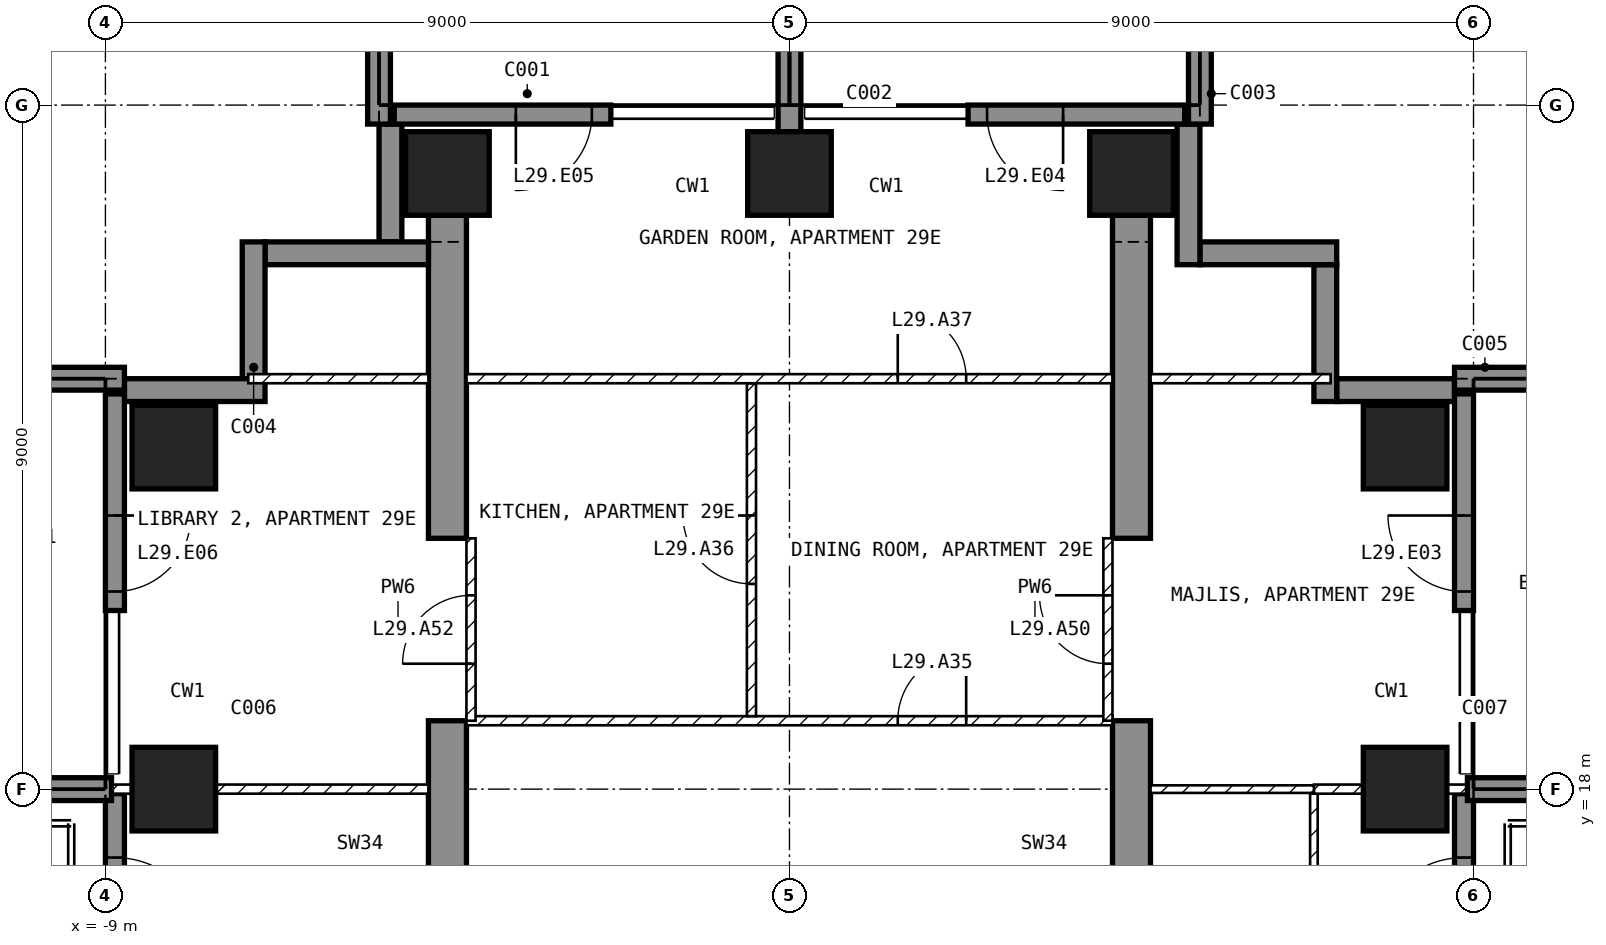
"""IFC4 building model, lengths in metres.
Left out: names, types, materials, properties, quantities, classifications, styles, units other than length and angle.
Written with IfcOpenShell. Run it as: python <this file> out.ifc"""

import sys

from ifc_helpers import new_model, si_unit, direction, frame, frame_2d, origin, origin_2d, place, context, subcontext, project, spatial, polyline, rectangle, outline, extrude, element, fill, save


model = new_model("IFC4")
c1 = context("Model", 3, precision=1e-05, world=origin(), true_north=direction((0.0, 1.0)))
c2 = subcontext(c1, "Body", "Model", "MODEL_VIEW")
j1 = project(units=[si_unit("LENGTHUNIT", "METRE"), si_unit("PLANEANGLEUNIT", "RADIAN")], contexts=[c1])
p1 = place(None, origin())
s1 = spatial("IfcSite", under=j1, at=p1, CompositionType="ELEMENT")
p2 = place(p1, origin())
s2 = spatial("IfcBuilding", under=s1, at=p2, CompositionType="ELEMENT")
p3 = place(p2, frame((0.0, 0.0, 123.4)))
s3 = spatial("IfcBuildingStorey", under=s2, at=p3, CompositionType="ELEMENT", Elevation=123.4)
for number, where, z_axis, x_axis in (
    (1, (-8.1, 18.0, -0.25), (0.0, 0.0, 1.0), (1.0, 0.0, 0.0)),
    (2, (-8.1, 22.5, -0.25), (0.0, 0.0, 1.0), (1.0, 0.0, 0.0)),
    (3, (-4.5, 26.1, -0.25), (0.0, 0.0, 1.0), (1.0, 0.0, 0.0)),
    (4, (0.0, 26.1, -0.25), (0.0, 0.0, 1.0), (1.0, 0.0, 0.0)),
    (5, (4.5, 26.1, -0.25), (0.0, 0.0, 1.0), (1.0, 0.0, 0.0)),
    (6, (8.1, 18.0, -0.25), (0.0, 0.0, 1.0), (1.0, 0.0, 0.0)),
    (7, (8.1, 22.5, -0.25), (0.0, 0.0, 1.0), (1.0, 0.0, 0.0)),
):
    element("IfcColumn", number, at=place(p3, frame(where, z_axis=z_axis, x_axis=x_axis)), inside=s3, PredefinedType="COLUMN", context=c2, shape_type="SweptSolid", body=[
        extrude(rectangle(XDim=1.1, YDim=1.1, at=origin_2d()), origin(), (0.0, 0.0, 1.0), 3.5),
    ])
for number, where, z_axis, x_axis in (
    (8, (-4.75, 9.0, -0.25), (1.0, 0.0, 0.0), (0.0, 1.0, 0.0)),
    (9, (4.25, 9.0, -0.25), (1.0, 0.0, 0.0), (0.0, 1.0, 0.0)),
):
    element("IfcWall", number, at=place(p3, frame(where, z_axis=z_axis, x_axis=x_axis)), inside=s3, PredefinedType="SHEAR", context=c2, shape_type="SweptSolid", body=[
        extrude(outline(polyline([(0.0, 0.0), (2.1, 0.0), (2.1, 2.65), (4.5, 2.65), (4.5, 0.0), (9.9, 0.0), (9.9, 2.65), (12.3, 2.65), (12.3, 0.0), (16.55, 0.0), (16.55, 3.5), (0.0, 3.5), (0.0, 0.0)])), origin(), (0.0, 0.0, 1.0), 0.5),
    ])
p4 = place(p3, frame((8.875, 15.65, 0.0), z_axis=(0.0, 0.0, 1.0), x_axis=(0.0, 1.0, 0.0)))
e10 = element("IfcWall", 10, at=p4, inside=s3, PredefinedType="SOLIDWALL", context=c2, shape_type="SweptSolid", body=[
    extrude(rectangle(XDim=2.29, YDim=0.25, at=frame_2d((1.145, 0.0))), origin(), (0.0, 0.0, 1.0), 3.25),
])
p5 = place(p4, frame((0.25, 0.0, 0.0)))
e11 = element("IfcOpeningElement", 11, at=p5, cuts=e10, PredefinedType="OPENING", context=c2, shape_type="SweptSolid", body=[
    extrude(rectangle(XDim=1.2, YDim=2.4, at=frame_2d((0.6, 1.2))), frame((0.0, 0.135, 0.0), z_axis=(0.0, -1.0, 0.0), x_axis=(1.0, 0.0, 0.0)), (0.0, 0.0, 1.0), 0.27),
])
p6 = place(p3, frame((8.875, 20.35, 0.0), z_axis=(0.0, 0.0, 1.0), x_axis=(0.0, 1.0, 0.0)))
e12 = element("IfcWall", 12, at=p6, inside=s3, PredefinedType="SOLIDWALL", context=c2, shape_type="SweptSolid", body=[
    extrude(rectangle(XDim=2.85, YDim=0.25, at=frame_2d((1.425, 0.0))), origin(), (0.0, 0.0, 1.0), 3.25),
])
p7 = place(p6, frame((0.25, 0.0, 0.0)))
e13 = element("IfcOpeningElement", 13, at=p7, cuts=e12, PredefinedType="OPENING", context=c2, shape_type="SweptSolid", body=[
    extrude(rectangle(XDim=1.0, YDim=2.4, at=frame_2d((0.5, 1.2))), frame((0.0, 0.135, 0.0), z_axis=(0.0, -1.0, 0.0), x_axis=(1.0, 0.0, 0.0)), (0.0, 0.0, 1.0), 0.27),
])
p8 = place(p3, frame((5.2, 26.875, 0.0), z_axis=(0.0, 0.0, 1.0), x_axis=(-1.0, 0.0, 0.0)))
e14 = element("IfcWall", 14, at=p8, inside=s3, PredefinedType="SOLIDWALL", context=c2, shape_type="SweptSolid", body=[
    extrude(rectangle(XDim=2.85, YDim=0.25, at=frame_2d((1.425, 0.0))), origin(), (0.0, 0.0, 1.0), 3.25),
])
p9 = place(p8, frame((1.6, 0.0, 0.0)))
e15 = element("IfcOpeningElement", 15, at=p9, cuts=e14, PredefinedType="OPENING", context=c2, shape_type="SweptSolid", body=[
    extrude(rectangle(XDim=1.0, YDim=2.4, at=frame_2d((0.5, 1.2))), frame((0.0, 0.135, 0.0), z_axis=(0.0, -1.0, 0.0), x_axis=(1.0, 0.0, 0.0)), (0.0, 0.0, 1.0), 0.27),
])
p10 = place(p3, frame((-2.35, 26.875, 0.0), z_axis=(0.0, 0.0, 1.0), x_axis=(-1.0, 0.0, 0.0)))
e16 = element("IfcWall", 16, at=p10, inside=s3, PredefinedType="SOLIDWALL", context=c2, shape_type="SweptSolid", body=[
    extrude(rectangle(XDim=2.85, YDim=0.25, at=frame_2d((1.425, 0.0))), origin(), (0.0, 0.0, 1.0), 3.25),
])
p11 = place(p10, frame((0.25, 0.0, 0.0)))
e17 = element("IfcOpeningElement", 17, at=p11, cuts=e16, PredefinedType="OPENING", context=c2, shape_type="SweptSolid", body=[
    extrude(rectangle(XDim=1.0, YDim=2.4, at=frame_2d((0.5, 1.2))), frame((0.0, 0.135, 0.0), z_axis=(0.0, -1.0, 0.0), x_axis=(1.0, 0.0, 0.0)), (0.0, 0.0, 1.0), 0.27),
])
p12 = place(p3, frame((-8.875, 23.2, 0.0), z_axis=(0.0, 0.0, 1.0), x_axis=(0.0, -1.0, 0.0)))
e18 = element("IfcWall", 18, at=p12, inside=s3, PredefinedType="SOLIDWALL", context=c2, shape_type="SweptSolid", body=[
    extrude(rectangle(XDim=2.85, YDim=0.25, at=frame_2d((1.425, 0.0))), origin(), (0.0, 0.0, 1.0), 3.25),
])
p13 = place(p12, frame((1.6, 0.0, 0.0)))
e19 = element("IfcOpeningElement", 19, at=p13, cuts=e18, PredefinedType="OPENING", context=c2, shape_type="SweptSolid", body=[
    extrude(rectangle(XDim=1.0, YDim=2.4, at=frame_2d((0.5, 1.2))), frame((0.0, 0.135, 0.0), z_axis=(0.0, -1.0, 0.0), x_axis=(1.0, 0.0, 0.0)), (0.0, 0.0, 1.0), 0.27),
])
p14 = place(p3, frame((-8.875, 17.94, 0.0), z_axis=(0.0, 0.0, 1.0), x_axis=(0.0, -1.0, 0.0)))
e20 = element("IfcWall", 20, at=p14, inside=s3, PredefinedType="SOLIDWALL", context=c2, shape_type="SweptSolid", body=[
    extrude(rectangle(XDim=2.29, YDim=0.25, at=frame_2d((1.145, 0.0))), origin(), (0.0, 0.0, 1.0), 3.25),
])
p15 = place(p14, frame((0.84, 0.0, 0.0)))
e21 = element("IfcOpeningElement", 21, at=p15, cuts=e20, PredefinedType="OPENING", context=c2, shape_type="SweptSolid", body=[
    extrude(rectangle(XDim=1.2, YDim=2.4, at=frame_2d((0.6, 1.2))), frame((0.0, 0.135, 0.0), z_axis=(0.0, -1.0, 0.0), x_axis=(1.0, 0.0, 0.0)), (0.0, 0.0, 1.0), 0.27),
])
p16 = place(p3, frame((8.75, 23.25, 0.0), z_axis=(0.0, 0.0, 1.0), x_axis=(-1.0, 0.0, 0.0)))
e22 = element("IfcWall", 22, at=p16, inside=s3, PredefinedType="SOLIDWALL", context=c2, shape_type="SweptSolid", body=[
    extrude(rectangle(XDim=1.55, YDim=0.3, at=frame_2d((0.775, 0.0))), origin(), (0.0, 0.0, 1.0), 3.25),
])
p17 = place(p3, frame((7.05, 23.1, 0.0), z_axis=(0.0, 0.0, 1.0), x_axis=(0.0, 1.0, 0.0)))
e23 = element("IfcWall", 23, at=p17, inside=s3, PredefinedType="SOLIDWALL", context=c2, shape_type="SweptSolid", body=[
    extrude(rectangle(XDim=1.8, YDim=0.3, at=frame_2d((0.9, 0.0))), origin(), (0.0, 0.0, 1.0), 3.25),
])
p18 = place(p3, frame((7.2, 25.05, 0.0), z_axis=(0.0, 0.0, 1.0), x_axis=(-1.0, 0.0, 0.0)))
e24 = element("IfcWall", 24, at=p18, inside=s3, PredefinedType="SOLIDWALL", context=c2, shape_type="SweptSolid", body=[
    extrude(rectangle(XDim=1.8, YDim=0.3, at=frame_2d((0.9, 0.0))), origin(), (0.0, 0.0, 1.0), 3.25),
])
p19 = place(p3, frame((5.25, 24.9, 0.0), z_axis=(0.0, 0.0, 1.0), x_axis=(0.0, 1.0, 0.0)))
e25 = element("IfcWall", 25, at=p19, inside=s3, PredefinedType="SOLIDWALL", context=c2, shape_type="SweptSolid", body=[
    extrude(rectangle(XDim=1.85, YDim=0.3, at=frame_2d((0.925, 0.0))), origin(), (0.0, 0.0, 1.0), 3.25),
])
p20 = place(p3, frame((-5.25, 26.75, 0.0), z_axis=(0.0, 0.0, 1.0), x_axis=(0.0, -1.0, 0.0)))
e26 = element("IfcWall", 26, at=p20, inside=s3, PredefinedType="SOLIDWALL", context=c2, shape_type="SweptSolid", body=[
    extrude(rectangle(XDim=1.55, YDim=0.3, at=frame_2d((0.775, 0.0))), origin(), (0.0, 0.0, 1.0), 3.25),
])
p21 = place(p3, frame((-4.75, 25.05, 0.0), z_axis=(0.0, 0.0, 1.0), x_axis=(-1.0, 0.0, 0.0)))
e27 = element("IfcWall", 27, at=p21, inside=s3, PredefinedType="SOLIDWALL", context=c2, shape_type="SweptSolid", body=[
    extrude(rectangle(XDim=2.15, YDim=0.3, at=frame_2d((1.075, 0.0))), origin(), (0.0, 0.0, 1.0), 3.25),
])
p22 = place(p3, frame((-7.05, 25.2, 0.0), z_axis=(0.0, 0.0, 1.0), x_axis=(0.0, -1.0, 0.0)))
e28 = element("IfcWall", 28, at=p22, inside=s3, PredefinedType="SOLIDWALL", context=c2, shape_type="SweptSolid", body=[
    extrude(rectangle(XDim=1.8, YDim=0.3, at=frame_2d((0.9, 0.0))), origin(), (0.0, 0.0, 1.0), 3.25),
])
p23 = place(p3, frame((-6.9, 23.25, 0.0), z_axis=(0.0, 0.0, 1.0), x_axis=(-1.0, 0.0, 0.0)))
e29 = element("IfcWall", 29, at=p23, inside=s3, PredefinedType="SOLIDWALL", context=c2, shape_type="SweptSolid", body=[
    extrude(rectangle(XDim=1.85, YDim=0.3, at=frame_2d((0.925, 0.0))), origin(), (0.0, 0.0, 1.0), 3.25),
])
p24 = place(p3, frame((-8.92, 18.0, 0.0), z_axis=(0.0, 0.0, 1.0), x_axis=(-1.0, 0.0, 0.0)))
e30 = element("IfcWall", 30, at=p24, inside=s3, PredefinedType="SOLIDWALL", context=c2, shape_type="SweptSolid", body=[
    extrude(rectangle(XDim=2.82, YDim=0.3, at=frame_2d((1.41, 0.0))), origin(), (0.0, 0.0, 1.0), 3.25),
])
for number, where, z_axis, x_axis in (
    (31, (-8.75, 23.4, 0.0), (0.0, 0.0, 1.0), (-1.0, 0.0, 0.0)),
    (32, (-5.4, 26.75, 0.0), (0.0, 0.0, 1.0), (0.0, 1.0, 0.0)),
):
    element("IfcWall", number, at=place(p3, frame(where, z_axis=z_axis, x_axis=x_axis)), inside=s3, PredefinedType="SOLIDWALL", context=c2, shape_type="SweptSolid", body=[
        extrude(rectangle(XDim=2.95, YDim=0.3, at=frame_2d((1.475, 0.0))), origin(), (0.0, 0.0, 1.0), 3.25),
    ])
p25 = place(p3, frame((0.0, 26.65, 0.0), z_axis=(0.0, 0.0, 1.0), x_axis=(0.0, 1.0, 0.0)))
e33 = element("IfcWall", 33, at=p25, inside=s3, PredefinedType="SOLIDWALL", context=c2, shape_type="SweptSolid", body=[
    extrude(rectangle(XDim=3.05, YDim=0.3, at=frame_2d((1.525, 0.0))), origin(), (0.0, 0.0, 1.0), 3.25),
])
p26 = place(p3, frame((5.4, 26.75, 0.0), z_axis=(0.0, 0.0, 1.0), x_axis=(0.0, 1.0, 0.0)))
e34 = element("IfcWall", 34, at=p26, inside=s3, PredefinedType="SOLIDWALL", context=c2, shape_type="SweptSolid", body=[
    extrude(rectangle(XDim=2.95, YDim=0.3, at=frame_2d((1.475, 0.0))), origin(), (0.0, 0.0, 1.0), 3.25),
])
p27 = place(p3, frame((8.92, 18.0, 0.0), z_axis=(0.0, 0.0, 1.0), x_axis=(1.0, 0.0, 0.0)))
e35 = element("IfcWall", 35, at=p27, inside=s3, PredefinedType="SOLIDWALL", context=c2, shape_type="SweptSolid", body=[
    extrude(rectangle(XDim=2.82, YDim=0.3, at=frame_2d((1.41, 0.0))), origin(), (0.0, 0.0, 1.0), 3.25),
])
p28 = place(p3, frame((8.75, 23.4, 0.0), z_axis=(0.0, 0.0, 1.0), x_axis=(1.0, 0.0, 0.0)))
e36 = element("IfcWall", 36, at=p28, inside=s3, PredefinedType="SOLIDWALL", context=c2, shape_type="SweptSolid", body=[
    extrude(rectangle(XDim=2.95, YDim=0.3, at=frame_2d((1.475, 0.0))), origin(), (0.0, 0.0, 1.0), 3.25),
])
p29 = place(p3, frame((-4.25, 18.9, 0.0), z_axis=(0.0, 0.0, 1.0), x_axis=(1.0, 0.0, 0.0)))
e37 = element("IfcWall", 37, at=p29, inside=s3, PredefinedType="PARTITIONING", context=c2, shape_type="SweptSolid", body=[
    extrude(rectangle(XDim=8.5, YDim=0.12, at=frame_2d((4.25, 0.0))), origin(), (0.0, 0.0, 1.0), 3.25),
])
p30 = place(p29, frame((5.675, 0.0, 0.0)))
e38 = element("IfcOpeningElement", 38, at=p30, cuts=e37, PredefinedType="OPENING", context=c2, shape_type="SweptSolid", body=[
    extrude(rectangle(XDim=0.9, YDim=2.1, at=frame_2d((0.45, 1.05))), frame((0.0, 0.07, 0.0), z_axis=(0.0, -1.0, 0.0), x_axis=(1.0, 0.0, 0.0)), (0.0, 0.0, 1.0), 0.14),
])
p31 = place(p3, frame((-0.5, 18.96, 0.0), z_axis=(0.0, 0.0, 1.0), x_axis=(0.0, 1.0, 0.0)))
e39 = element("IfcWall", 39, at=p31, inside=s3, PredefinedType="PARTITIONING", context=c2, shape_type="SweptSolid", body=[
    extrude(rectangle(XDim=4.38, YDim=0.12, at=frame_2d((2.19, 0.0))), origin(), (0.0, 0.0, 1.0), 3.25),
])
p32 = place(p31, frame((1.74, 0.0, 0.0)))
e40 = element("IfcOpeningElement", 40, at=p32, cuts=e39, PredefinedType="OPENING", context=c2, shape_type="SweptSolid", body=[
    extrude(rectangle(XDim=0.9, YDim=2.1, at=frame_2d((0.45, 1.05))), frame((0.0, 0.07, 0.0), z_axis=(0.0, -1.0, 0.0), x_axis=(1.0, 0.0, 0.0)), (0.0, 0.0, 1.0), 0.14),
])
p33 = place(p3, frame((-4.25, 23.4, 0.0), z_axis=(0.0, 0.0, 1.0), x_axis=(1.0, 0.0, 0.0)))
e41 = element("IfcWall", 41, at=p33, inside=s3, PredefinedType="PARTITIONING", context=c2, shape_type="SweptSolid", body=[
    extrude(rectangle(XDim=8.5, YDim=0.12, at=frame_2d((4.25, 0.0))), origin(), (0.0, 0.0, 1.0), 3.25),
])
p34 = place(p33, frame((5.675, 0.0, 0.0)))
e42 = element("IfcOpeningElement", 42, at=p34, cuts=e41, PredefinedType="OPENING", context=c2, shape_type="SweptSolid", body=[
    extrude(rectangle(XDim=0.9, YDim=2.1, at=frame_2d((0.45, 1.05))), frame((0.0, 0.07, 0.0), z_axis=(0.0, -1.0, 0.0), x_axis=(1.0, 0.0, 0.0)), (0.0, 0.0, 1.0), 0.14),
])
p35 = place(p3, frame((6.9, 14.45, 0.0), z_axis=(0.0, 0.0, 1.0), x_axis=(0.0, 1.0, 0.0)))
e43 = element("IfcWall", 43, at=p35, inside=s3, PredefinedType="PARTITIONING", context=c2, shape_type="SweptSolid", body=[
    extrude(rectangle(XDim=3.49, YDim=0.1, at=frame_2d((1.745, 0.0))), origin(), (0.0, 0.0, 1.0), 3.25),
])
p36 = place(p3, frame((6.9, 18.0, 0.0), z_axis=(0.0, 0.0, 1.0), x_axis=(1.0, 0.0, 0.0)))
e44 = element("IfcWall", 44, at=p36, inside=s3, PredefinedType="PARTITIONING", context=c2, shape_type="SweptSolid", body=[
    extrude(rectangle(XDim=2.02, YDim=0.12, at=frame_2d((1.01, 0.0))), origin(), (0.0, 0.0, 1.0), 2.414),
])
p37 = place(p3, frame((4.75, 18.0, 0.0), z_axis=(0.0, 0.0, 1.0), x_axis=(1.0, 0.0, 0.0)))
e45 = element("IfcWall", 45, at=p37, inside=s3, PredefinedType="PARTITIONING", context=c2, shape_type="SweptSolid", body=[
    extrude(rectangle(XDim=2.15, YDim=0.1, at=frame_2d((1.075, 0.0))), origin(), (0.0, 0.0, 1.0), 2.414),
])
p38 = place(p3, frame((4.75, 23.4, 0.0), z_axis=(0.0, 0.0, 1.0), x_axis=(1.0, 0.0, 0.0)))
e46 = element("IfcWall", 46, at=p38, inside=s3, PredefinedType="PARTITIONING", context=c2, shape_type="SweptSolid", body=[
    extrude(rectangle(XDim=2.37, YDim=0.12, at=frame_2d((1.185, 0.0))), origin(), (0.0, 0.0, 1.0), 3.25),
])
p39 = place(p3, frame((-8.92, 18.0, 0.0), z_axis=(0.0, 0.0, 1.0), x_axis=(1.0, 0.0, 0.0)))
e47 = element("IfcWall", 47, at=p39, inside=s3, PredefinedType="PARTITIONING", context=c2, shape_type="SweptSolid", body=[
    extrude(rectangle(XDim=4.17, YDim=0.12, at=frame_2d((2.085, 0.0))), origin(), (0.0, 0.0, 1.0), 2.414),
])
p40 = place(p3, frame((-7.12, 23.4, 0.0), z_axis=(0.0, 0.0, 1.0), x_axis=(1.0, 0.0, 0.0)))
e48 = element("IfcWall", 48, at=p40, inside=s3, PredefinedType="PARTITIONING", context=c2, shape_type="SweptSolid", body=[
    extrude(rectangle(XDim=2.37, YDim=0.12, at=frame_2d((1.185, 0.0))), origin(), (0.0, 0.0, 1.0), 3.25),
])
p41 = place(p3, frame((4.19, 18.9, 0.0), z_axis=(0.0, 0.0, 1.0), x_axis=(0.0, 1.0, 0.0)))
e49 = element("IfcWall", 49, at=p41, inside=s3, PredefinedType="PARTITIONING", context=c2, shape_type="SweptSolid", body=[
    extrude(rectangle(XDim=2.4, YDim=0.12, at=frame_2d((1.2, 0.0))), origin(), (0.0, 0.0, 1.0), 2.4),
])
p42 = place(p41, frame((0.75, 0.0, 0.0)))
e50 = element("IfcOpeningElement", 50, at=p42, cuts=e49, PredefinedType="OPENING", context=c2, shape_type="SweptSolid", body=[
    extrude(rectangle(XDim=0.9, YDim=2.1, at=frame_2d((0.45, 1.05))), frame((0.0, 0.07, 0.0), z_axis=(0.0, -1.0, 0.0), x_axis=(1.0, 0.0, 0.0)), (0.0, 0.0, 1.0), 0.14),
])
p43 = place(p3, frame((-4.19, 18.9, 0.0), z_axis=(0.0, 0.0, 1.0), x_axis=(0.0, 1.0, 0.0)))
e51 = element("IfcWall", 51, at=p43, inside=s3, PredefinedType="PARTITIONING", context=c2, shape_type="SweptSolid", body=[
    extrude(rectangle(XDim=2.4, YDim=0.12, at=frame_2d((1.2, 0.0))), origin(), (0.0, 0.0, 1.0), 2.4),
])
p44 = place(p43, frame((0.75, 0.0, 0.0)))
e52 = element("IfcOpeningElement", 52, at=p44, cuts=e51, PredefinedType="OPENING", context=c2, shape_type="SweptSolid", body=[
    extrude(rectangle(XDim=0.9, YDim=2.1, at=frame_2d((0.45, 1.05))), frame((0.0, 0.07, 0.0), z_axis=(0.0, -1.0, 0.0), x_axis=(1.0, 0.0, 0.0)), (0.0, 0.0, 1.0), 0.14),
])
p45 = place(p5, origin())
e53 = element("IfcDoor", 53, at=p45, inside=s3, OperationType="SINGLE_SWING_LEFT", PredefinedType="DOOR", context=c2, shape_type="SweptSolid", body=[
    extrude(rectangle(XDim=1.2, YDim=2.4, at=frame_2d((0.6, 1.2))), frame((0.0, 0.025, 0.0), z_axis=(0.0, -1.0, 0.0), x_axis=(1.0, 0.0, 0.0)), (0.0, 0.0, 1.0), 0.05),
])
fill(e11, e53)
p46 = place(p7, origin())
e54 = element("IfcDoor", 54, at=p46, inside=s3, OperationType="SINGLE_SWING_RIGHT", PredefinedType="DOOR", context=c2, shape_type="SweptSolid", body=[
    extrude(rectangle(XDim=1.0, YDim=2.4, at=frame_2d((0.5, 1.2))), frame((0.0, 0.025, 0.0), z_axis=(0.0, -1.0, 0.0), x_axis=(1.0, 0.0, 0.0)), (0.0, 0.0, 1.0), 0.05),
])
fill(e13, e54)
p47 = place(p9, origin())
e55 = element("IfcDoor", 55, at=p47, inside=s3, OperationType="SINGLE_SWING_LEFT", PredefinedType="DOOR", context=c2, shape_type="SweptSolid", body=[
    extrude(rectangle(XDim=1.0, YDim=2.4, at=frame_2d((0.5, 1.2))), frame((0.0, 0.025, 0.0), z_axis=(0.0, -1.0, 0.0), x_axis=(1.0, 0.0, 0.0)), (0.0, 0.0, 1.0), 0.05),
])
fill(e15, e55)
p48 = place(p11, origin())
e56 = element("IfcDoor", 56, at=p48, inside=s3, OperationType="SINGLE_SWING_RIGHT", PredefinedType="DOOR", context=c2, shape_type="SweptSolid", body=[
    extrude(rectangle(XDim=1.0, YDim=2.4, at=frame_2d((0.5, 1.2))), frame((0.0, 0.025, 0.0), z_axis=(0.0, -1.0, 0.0), x_axis=(1.0, 0.0, 0.0)), (0.0, 0.0, 1.0), 0.05),
])
fill(e17, e56)
p49 = place(p13, origin())
e57 = element("IfcDoor", 57, at=p49, inside=s3, OperationType="SINGLE_SWING_LEFT", PredefinedType="DOOR", context=c2, shape_type="SweptSolid", body=[
    extrude(rectangle(XDim=1.0, YDim=2.4, at=frame_2d((0.5, 1.2))), frame((0.0, 0.025, 0.0), z_axis=(0.0, -1.0, 0.0), x_axis=(1.0, 0.0, 0.0)), (0.0, 0.0, 1.0), 0.05),
])
fill(e19, e57)
p50 = place(p15, origin())
e58 = element("IfcDoor", 58, at=p50, inside=s3, OperationType="SINGLE_SWING_RIGHT", PredefinedType="DOOR", context=c2, shape_type="SweptSolid", body=[
    extrude(rectangle(XDim=1.2, YDim=2.4, at=frame_2d((0.6, 1.2))), frame((0.0, 0.025, 0.0), z_axis=(0.0, -1.0, 0.0), x_axis=(1.0, 0.0, 0.0)), (0.0, 0.0, 1.0), 0.05),
])
fill(e21, e58)
p51 = place(p30, origin())
e59 = element("IfcDoor", 59, at=p51, inside=s3, OperationType="SINGLE_SWING_RIGHT", PredefinedType="DOOR", context=c2, shape_type="SweptSolid", body=[
    extrude(rectangle(XDim=0.9, YDim=2.1, at=frame_2d((0.45, 1.05))), frame((0.0, 0.025, 0.0), z_axis=(0.0, -1.0, 0.0), x_axis=(1.0, 0.0, 0.0)), (0.0, 0.0, 1.0), 0.05),
])
fill(e38, e59)
p52 = place(p32, origin())
e60 = element("IfcDoor", 60, at=p52, inside=s3, OperationType="SINGLE_SWING_RIGHT", PredefinedType="DOOR", context=c2, shape_type="SweptSolid", body=[
    extrude(rectangle(XDim=0.9, YDim=2.1, at=frame_2d((0.45, 1.05))), frame((0.0, 0.025, 0.0), z_axis=(0.0, -1.0, 0.0), x_axis=(1.0, 0.0, 0.0)), (0.0, 0.0, 1.0), 0.05),
])
fill(e40, e60)
p53 = place(p34, origin())
e61 = element("IfcDoor", 61, at=p53, inside=s3, OperationType="SINGLE_SWING_LEFT", PredefinedType="DOOR", context=c2, shape_type="SweptSolid", body=[
    extrude(rectangle(XDim=0.9, YDim=2.1, at=frame_2d((0.45, 1.05))), frame((0.0, 0.025, 0.0), z_axis=(0.0, -1.0, 0.0), x_axis=(1.0, 0.0, 0.0)), (0.0, 0.0, 1.0), 0.05),
])
fill(e42, e61)
p54 = place(p42, origin())
e62 = element("IfcDoor", 62, at=p54, inside=s3, OperationType="SINGLE_SWING_RIGHT", PredefinedType="DOOR", context=c2, shape_type="SweptSolid", body=[
    extrude(rectangle(XDim=0.9, YDim=2.1, at=frame_2d((0.45, 1.05))), frame((0.0, 0.025, 0.0), z_axis=(0.0, -1.0, 0.0), x_axis=(1.0, 0.0, 0.0)), (0.0, 0.0, 1.0), 0.05),
])
fill(e50, e62)
p55 = place(p44, origin())
e63 = element("IfcDoor", 63, at=p55, inside=s3, OperationType="SINGLE_SWING_LEFT", PredefinedType="DOOR", context=c2, shape_type="SweptSolid", body=[
    extrude(rectangle(XDim=0.9, YDim=2.1, at=frame_2d((0.45, 1.05))), frame((0.0, 0.025, 0.0), z_axis=(0.0, -1.0, 0.0), x_axis=(1.0, 0.0, 0.0)), (0.0, 0.0, 1.0), 0.05),
])
fill(e52, e63)
save(model, sys.argv[1])
